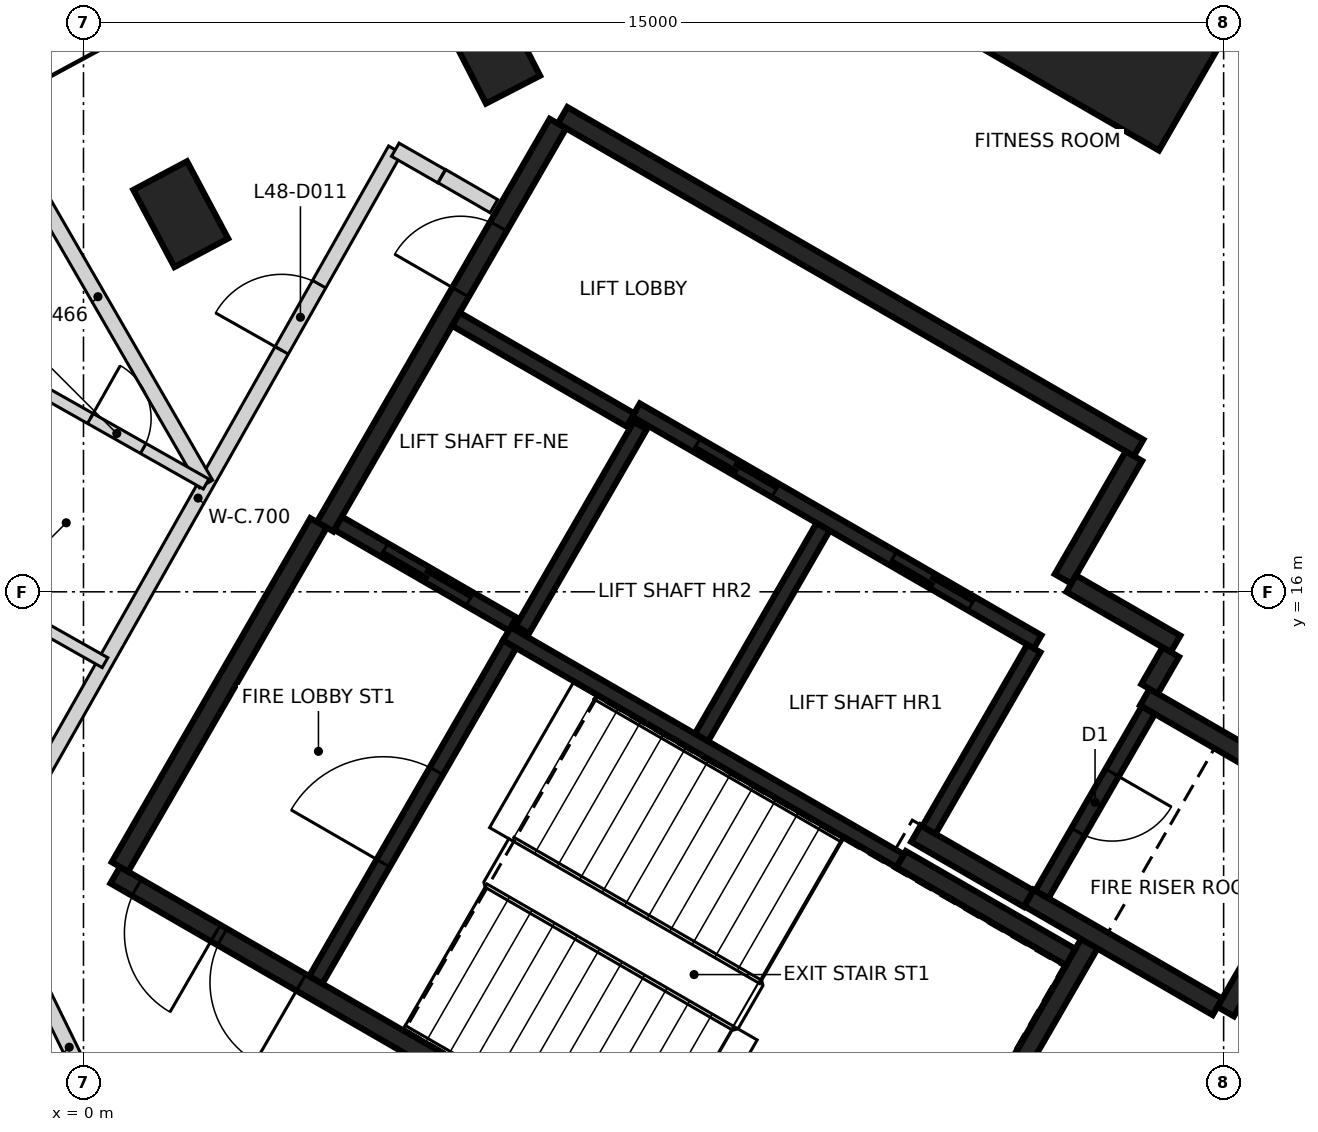
"""IFC4 building model, lengths in metres.
Left out: names, types, materials, properties, quantities, classifications, styles, units other than length and angle.
Written with IfcOpenShell. Run it as: python <this file> out.ifc"""

import sys

from ifc_helpers import new_model, si_unit, direction, frame, frame_2d, origin, origin_2d, place, context, subcontext, project, spatial, rectangle, extrude, element, fill, save


model = new_model("IFC4")
c1 = context("Model", 3, precision=1e-05, world=origin(), true_north=direction((0.0, 1.0)))
c2 = subcontext(c1, "Body", "Model", "MODEL_VIEW")
j1 = project(units=[si_unit("LENGTHUNIT", "METRE"), si_unit("PLANEANGLEUNIT", "RADIAN")], contexts=[c1])
p1 = place(None, origin())
s1 = spatial("IfcSite", under=j1, at=p1, CompositionType="ELEMENT")
p2 = place(p1, origin())
s2 = spatial("IfcBuilding", under=s1, at=p2, CompositionType="ELEMENT")
p3 = place(p2, frame((0.0, 0.0, 193.6)))
s3 = spatial("IfcBuildingStorey", under=s2, at=p3, CompositionType="ELEMENT", Elevation=193.6)
for number, where, z_axis, x_axis in (
    (1, (5.388, 23.118, -0.35), (0.0, 0.0, 1.0), (-0.458, 0.889, 0.0)),
    (2, (1.279, 20.968, -0.35), (0.0, 0.0, 1.0), (-0.47, 0.883, 0.0)),
):
    element("IfcColumn", number, at=place(p3, frame(where, z_axis=z_axis, x_axis=x_axis)), inside=s3, PredefinedType="COLUMN", context=c2, shape_type="SweptSolid", body=[
        extrude(rectangle(XDim=1.15, YDim=0.8, at=origin_2d()), origin(), (0.0, 0.0, 1.0), 3.6),
    ])
p4 = place(p3, frame((13.78, 23.867, -0.35), z_axis=(0.0, 0.0, 1.0), x_axis=(0.5, 0.866025403784, 0.0)))
e3 = element("IfcColumn", 3, at=p4, inside=s3, PredefinedType="COLUMN", context=c2, shape_type="SweptSolid", body=[
    extrude(rectangle(XDim=3.2, YDim=2.7, at=origin_2d()), origin(), (0.0, 0.0, 1.0), 3.6),
])
p5 = place(p3, frame((10.42, 6.498, 0.0), z_axis=(0.0, 0.0, 1.0), x_axis=(-0.866021906294, 0.500006057782, 0.0)))
e4 = element("IfcWall", 4, at=p5, inside=s3, PredefinedType="SHEAR", context=c2, shape_type="SweptSolid", body=[
    extrude(rectangle(XDim=11.55, YDim=0.25, at=frame_2d((5.775, 0.0))), origin(), (0.0, 0.0, 1.0), 3.25),
])
p6 = place(p5, frame((10.025, 0.0, 0.0)))
e5 = element("IfcOpeningElement", 5, at=p6, cuts=e4, PredefinedType="OPENING", context=c2, shape_type="SweptSolid", body=[
    extrude(rectangle(XDim=1.2, YDim=2.1, at=frame_2d((0.6, 1.05))), frame((0.0, 0.135, 0.0), z_axis=(0.0, -1.0, 0.0), x_axis=(1.0, 0.0, 0.0)), (0.0, 0.0, 1.0), 0.27),
])
p7 = place(p5, frame((8.725, 0.0, 0.0)))
e6 = element("IfcOpeningElement", 6, at=p7, cuts=e4, PredefinedType="OPENING", context=c2, shape_type="SweptSolid", body=[
    extrude(rectangle(XDim=1.2, YDim=2.1, at=frame_2d((0.6, 1.05))), frame((0.0, 0.135, 0.0), z_axis=(0.0, -1.0, 0.0), x_axis=(1.0, 0.0, 0.0)), (0.0, 0.0, 1.0), 0.27),
])
p8 = place(p3, frame((6.304, 22.269, 0.0), z_axis=(0.0, 0.0, 1.0), x_axis=(0.866022959057, -0.500004234368, 0.0)))
e7 = element("IfcWall", 7, at=p8, inside=s3, PredefinedType="SHEAR", context=c2, shape_type="SweptSolid", body=[
    extrude(rectangle(XDim=8.75, YDim=0.25, at=frame_2d((4.375, 0.0))), origin(), (0.0, 0.0, 1.0), 3.25),
])
p9 = place(p3, frame((3.179, 16.856, 0.0), z_axis=(0.0, 0.0, 1.0), x_axis=(0.500001955336, 0.866024274868, 0.0)))
e8 = element("IfcWall", 8, at=p9, inside=s3, PredefinedType="SHEAR", context=c2, shape_type="SweptSolid", body=[
    extrude(rectangle(XDim=6.125, YDim=0.25, at=frame_2d((3.062, 0.0))), origin(), (0.0, 0.0, 1.0), 3.25),
])
p10 = place(p9, frame((3.563, 0.0, 0.0)))
e9 = element("IfcOpeningElement", 9, at=p10, cuts=e8, PredefinedType="OPENING", context=c2, shape_type="SweptSolid", body=[
    extrude(rectangle(XDim=1.0, YDim=2.1, at=frame_2d((0.5, 1.05))), frame((0.0, 0.135, 0.0), z_axis=(0.0, -1.0, 0.0), x_axis=(1.0, 0.0, 0.0)), (0.0, 0.0, 1.0), 0.27),
])
p11 = place(p3, frame((0.48, 12.381, 0.0), z_axis=(0.0, 0.0, 1.0), x_axis=(0.49999885962, 0.866026062182, 0.0)))
e10 = element("IfcWall", 10, at=p11, inside=s3, PredefinedType="SHEAR", context=c2, shape_type="SweptSolid", body=[
    extrude(rectangle(XDim=5.225, YDim=0.25, at=frame_2d((2.612, 0.0))), origin(), (0.0, 0.0, 1.0), 3.25),
])
p12 = place(p3, frame((13.238, 11.378, 0.0), z_axis=(0.0, 0.0, 1.0), x_axis=(-0.500008851346, -0.866020293397, 0.0)))
e11 = element("IfcWall", 11, at=p12, inside=s3, PredefinedType="SHEAR", context=c2, shape_type="SweptSolid", body=[
    extrude(rectangle(XDim=5.51, YDim=0.25, at=frame_2d((2.755, 0.0))), origin(), (0.0, 0.0, 1.0), 3.25),
])
p13 = place(p3, frame((16.552, 13.119, 0.0), z_axis=(0.0, 0.0, 1.0), x_axis=(-0.499978833458, -0.866037623948, 0.0)))
e12 = element("IfcWall", 12, at=p13, inside=s3, PredefinedType="SHEAR", context=c2, shape_type="SweptSolid", body=[
    extrude(rectangle(XDim=3.05, YDim=0.25, at=frame_2d((1.525, 0.0))), origin(), (0.0, 0.0, 1.0), 3.25),
])
p14 = place(p3, frame((14.918, 10.54, 0.0), z_axis=(0.0, 0.0, 1.0), x_axis=(-0.866063538972, 0.499933942099, 0.0)))
e13 = element("IfcWall", 13, at=p14, inside=s3, PredefinedType="SHEAR", context=c2, shape_type="SweptSolid", body=[
    extrude(rectangle(XDim=2.865, YDim=0.25, at=frame_2d((1.432, 0.0))), origin(), (0.0, 0.0, 1.0), 3.25),
])
p15 = place(p3, frame((13.963, 14.614, 0.0), z_axis=(0.0, 0.0, 1.0), x_axis=(0.866042235819, -0.499970844928, 0.0)))
e14 = element("IfcWall", 14, at=p15, inside=s3, PredefinedType="SHEAR", context=c2, shape_type="SweptSolid", body=[
    extrude(rectangle(XDim=2.865, YDim=0.25, at=frame_2d((1.432, 0.0))), origin(), (0.0, 0.0, 1.0), 3.25),
])
p16 = place(p3, frame((10.757, 12.481, 0.0), z_axis=(0.0, 0.0, 1.0), x_axis=(0.866022940537, -0.500004266446, 0.0)))
e15 = element("IfcWall", 15, at=p16, inside=s3, PredefinedType="SHEAR", context=c2, shape_type="SweptSolid", body=[
    extrude(rectangle(XDim=2.575, YDim=0.25, at=frame_2d((1.287, 0.0))), origin(), (0.0, 0.0, 1.0), 3.25),
])
p17 = place(p3, frame((13.819, 17.785, 0.0), z_axis=(0.0, 0.0, 1.0), x_axis=(-0.500039802285, -0.866002422705, 0.0)))
e16 = element("IfcWall", 16, at=p17, inside=s3, PredefinedType="SHEAR", context=c2, shape_type="SweptSolid", body=[
    extrude(rectangle(XDim=1.865, YDim=0.25, at=frame_2d((0.932, 0.0))), origin(), (0.0, 0.0, 1.0), 3.25),
])
p18 = place(p3, frame((12.433, 11.964, 0.0), z_axis=(0.0, 0.0, 1.0), x_axis=(-0.866038183914, 0.499977863513, 0.0)))
e17 = element("IfcWall", 17, at=p18, inside=s3, PredefinedType="SHEAR", context=c2, shape_type="SweptSolid", body=[
    extrude(rectangle(XDim=1.71, YDim=0.25, at=frame_2d((0.855, 0.0))), origin(), (0.0, 0.0, 1.0), 3.25),
])
p19 = place(p3, frame((12.995, 16.108, 0.0), z_axis=(0.0, 0.0, 1.0), x_axis=(0.866044474677, -0.49996696679, 0.0)))
e18 = element("IfcWall", 18, at=p19, inside=s3, PredefinedType="SHEAR", context=c2, shape_type="SweptSolid", body=[
    extrude(rectangle(XDim=1.584, YDim=0.25, at=frame_2d((0.792, 0.0))), origin(), (0.0, 0.0, 1.0), 3.25),
])
p20 = place(p3, frame((14.305, 15.207, 0.0), z_axis=(0.0, 0.0, 1.0), x_axis=(-0.499848422343, -0.866112899501, 0.0)))
e19 = element("IfcWall", 19, at=p20, inside=s3, PredefinedType="SHEAR", context=c2, shape_type="SweptSolid", body=[
    extrude(rectangle(XDim=0.559, YDim=0.25, at=frame_2d((0.28, 0.0))), origin(), (0.0, 0.0, 1.0), 3.25),
])
p21 = place(p3, frame((12.552, 15.342, 0.0), z_axis=(0.0, 0.0, 1.0), x_axis=(-0.866030299012, 0.499991521122, 0.0)))
e20 = element("IfcWall", 20, at=p21, inside=s3, PredefinedType="SHEAR", context=c2, shape_type="SweptSolid", body=[
    extrude(rectangle(XDim=6.1, YDim=0.2, at=frame_2d((3.05, 0.0))), origin(), (0.0, 0.0, 1.0), 3.25),
])
p22 = place(p21, frame((1.0, 0.0, 0.0)))
e21 = element("IfcOpeningElement", 21, at=p22, cuts=e20, PredefinedType="OPENING", context=c2, shape_type="SweptSolid", body=[
    extrude(rectangle(XDim=1.2, YDim=2.1, at=frame_2d((0.6, 1.05))), frame((0.0, 0.11, 0.0), z_axis=(0.0, -1.0, 0.0), x_axis=(1.0, 0.0, 0.0)), (0.0, 0.0, 1.0), 0.22),
])
p23 = place(p21, frame((3.982, 0.0, 0.0)))
e22 = element("IfcOpeningElement", 22, at=p23, cuts=e20, PredefinedType="OPENING", context=c2, shape_type="SweptSolid", body=[
    extrude(rectangle(XDim=1.2, YDim=2.1, at=frame_2d((0.6, 1.05))), frame((0.0, 0.11, 0.0), z_axis=(0.0, -1.0, 0.0), x_axis=(1.0, 0.0, 0.0)), (0.0, 0.0, 1.0), 0.22),
])
p24 = place(p3, frame((10.743, 12.46, 0.0), z_axis=(0.0, 0.0, 1.0), x_axis=(-0.866018848283, 0.500011354289, 0.0)))
e23 = element("IfcWall", 23, at=p24, inside=s3, PredefinedType="SHEAR", context=c2, shape_type="SweptSolid", body=[
    extrude(rectangle(XDim=5.974, YDim=0.2, at=frame_2d((2.987, 0.0))), origin(), (0.0, 0.0, 1.0), 3.25),
])
p25 = place(p3, frame((3.057, 10.895, 0.0), z_axis=(0.0, 0.0, 1.0), x_axis=(0.500027839223, 0.866009330205, 0.0)))
e24 = element("IfcWall", 24, at=p25, inside=s3, PredefinedType="SHEAR", context=c2, shape_type="SweptSolid", body=[
    extrude(rectangle(XDim=5.098, YDim=0.2, at=frame_2d((2.549, 0.0))), origin(), (0.0, 0.0, 1.0), 3.25),
])
p26 = place(p25, frame((1.774, 0.0, 0.0)))
e25 = element("IfcOpeningElement", 25, at=p26, cuts=e24, PredefinedType="OPENING", context=c2, shape_type="SweptSolid", body=[
    extrude(rectangle(XDim=1.4, YDim=2.1, at=frame_2d((0.7, 1.05))), frame((0.0, 0.11, 0.0), z_axis=(0.0, -1.0, 0.0), x_axis=(1.0, 0.0, 0.0)), (0.0, 0.0, 1.0), 0.22),
])
p27 = place(p3, frame((8.132, 14.084, 0.0), z_axis=(0.0, 0.0, 1.0), x_axis=(0.500030834389, 0.86600760081, 0.0)))
e26 = element("IfcWall", 26, at=p27, inside=s3, PredefinedType="SHEAR", context=c2, shape_type="SweptSolid", body=[
    extrude(rectangle(XDim=3.198, YDim=0.2, at=frame_2d((1.599, 0.0))), origin(), (0.0, 0.0, 1.0), 3.25),
])
p28 = place(p3, frame((14.008, 14.442, 0.0), z_axis=(0.0, 0.0, 1.0), x_axis=(-0.499986818241, -0.866033014143, 0.0)))
e27 = element("IfcWall", 27, at=p28, inside=s3, PredefinedType="SHEAR", context=c2, shape_type="SweptSolid", body=[
    extrude(rectangle(XDim=2.798, YDim=0.2, at=frame_2d((1.399, 0.0))), origin(), (0.0, 0.0, 1.0), 3.25),
])
p29 = place(p28, frame((0.949, 0.0, 0.0)))
e28 = element("IfcOpeningElement", 28, at=p29, cuts=e27, PredefinedType="OPENING", context=c2, shape_type="SweptSolid", body=[
    extrude(rectangle(XDim=0.9, YDim=2.1, at=frame_2d((0.45, 1.05))), frame((0.0, 0.11, 0.0), z_axis=(0.0, -1.0, 0.0), x_axis=(1.0, 0.0, 0.0)), (0.0, 0.0, 1.0), 0.22),
])
p30 = place(p3, frame((12.502, 15.255, 0.0), z_axis=(0.0, 0.0, 1.0), x_axis=(-0.499965018551, -0.866045599391, 0.0)))
e29 = element("IfcWall", 29, at=p30, inside=s3, PredefinedType="SHEAR", context=c2, shape_type="SweptSolid", body=[
    extrude(rectangle(XDim=2.759, YDim=0.2, at=frame_2d((1.379, 0.0))), origin(), (0.0, 0.0, 1.0), 3.25),
])
p31 = place(p3, frame((7.324, 18.187, 0.0), z_axis=(0.0, 0.0, 1.0), x_axis=(-0.499967891604, -0.866043940782, 0.0)))
e30 = element("IfcWall", 30, at=p31, inside=s3, PredefinedType="SHEAR", context=c2, shape_type="SweptSolid", body=[
    extrude(rectangle(XDim=3.1, YDim=0.2, at=frame_2d((1.55, 0.0))), origin(), (0.0, 0.0, 1.0), 3.25),
])
p32 = place(p3, frame((5.646, 15.576, 0.0), z_axis=(0.0, 0.0, 1.0), x_axis=(-0.866018407898, 0.500012117035, 0.0)))
e31 = element("IfcWall", 31, at=p32, inside=s3, PredefinedType="SHEAR", context=c2, shape_type="SweptSolid", body=[
    extrude(rectangle(XDim=2.651, YDim=0.2, at=frame_2d((1.325, 0.0))), origin(), (0.0, 0.0, 1.0), 3.25),
])
p33 = place(p32, frame((0.652, 0.0, 0.0)))
e32 = element("IfcOpeningElement", 32, at=p33, cuts=e31, PredefinedType="OPENING", context=c2, shape_type="SweptSolid", body=[
    extrude(rectangle(XDim=1.3, YDim=2.1, at=frame_2d((0.65, 1.05))), frame((0.0, 0.11, 0.0), z_axis=(0.0, -1.0, 0.0), x_axis=(1.0, 0.0, 0.0)), (0.0, 0.0, 1.0), 0.22),
])
p34 = place(p3, frame((7.196, 18.26, 0.0), z_axis=(0.0, 0.0, 1.0), x_axis=(-0.866018407898, 0.500012117035, 0.0)))
e33 = element("IfcWall", 33, at=p34, inside=s3, PredefinedType="SHEAR", context=c2, shape_type="SweptSolid", body=[
    extrude(rectangle(XDim=2.651, YDim=0.2, at=frame_2d((1.325, 0.0))), origin(), (0.0, 0.0, 1.0), 3.25),
])
p35 = place(p3, frame((-1.085, 12.65, 0.0), z_axis=(0.0, 0.0, 1.0), x_axis=(0.49243456751, 0.870349468157, 0.0)))
e34 = element("IfcWall", 34, at=p35, inside=s3, PredefinedType="PARTITIONING", context=c2, shape_type="SweptSolid", body=[
    extrude(rectangle(XDim=10.531, YDim=0.2, at=frame_2d((5.266, 0.0))), origin(), (0.0, 0.0, 1.0), 3.25),
])
p36 = place(p35, frame((7.499, 0.0, 0.0)))
e35 = element("IfcOpeningElement", 35, at=p36, cuts=e34, PredefinedType="OPENING", context=c2, shape_type="SweptSolid", body=[
    extrude(rectangle(XDim=1.0, YDim=2.1, at=frame_2d((0.5, 1.05))), frame((0.0, 0.11, 0.0), z_axis=(0.0, -1.0, 0.0), x_axis=(1.0, 0.0, 0.0)), (0.0, 0.0, 1.0), 0.22),
])
p37 = place(p3, frame((-0.964, 11.595, 0.0), z_axis=(0.0, 0.0, 1.0), x_axis=(0.439787800928, -0.898101714816, 0.0)))
e36 = element("IfcWall", 36, at=p37, inside=s3, PredefinedType="PARTITIONING", context=c2, shape_type="SweptSolid", body=[
    extrude(rectangle(XDim=3.532, YDim=0.2, at=frame_2d((1.766, 0.0))), origin(), (0.0, 0.0, 1.0), 3.25),
])
p38 = place(p37, frame((2.382, 0.0, 0.0)))
e37 = element("IfcOpeningElement", 37, at=p38, cuts=e36, PredefinedType="OPENING", context=c2, shape_type="SweptSolid", body=[
    extrude(rectangle(XDim=0.95, YDim=2.1, at=frame_2d((0.475, 1.05))), frame((0.0, 0.11, 0.0), z_axis=(0.0, -1.0, 0.0), x_axis=(1.0, 0.0, 0.0)), (0.0, 0.0, 1.0), 0.22),
])
p39 = place(p3, frame((4.102, 21.816, 0.0), z_axis=(0.0, 0.0, 1.0), x_axis=(0.867664502326, -0.497150189986, 0.0)))
e38 = element("IfcWall", 38, at=p39, inside=s3, PredefinedType="PARTITIONING", context=c2, shape_type="SweptSolid", body=[
    extrude(rectangle(XDim=0.702, YDim=0.2, at=frame_2d((0.351, 0.0))), origin(), (0.0, 0.0, 1.0), 3.25),
])
p40 = place(p3, frame((4.716, 21.468, 0.0), z_axis=(0.0, 0.0, 1.0), x_axis=(0.865912682783, -0.500195187698, 0.0)))
e39 = element("IfcWall", 39, at=p40, inside=s3, PredefinedType="PARTITIONING", context=c2, shape_type="SweptSolid", body=[
    extrude(rectangle(XDim=0.79, YDim=0.2, at=frame_2d((0.395, 0.0))), origin(), (0.0, 0.0, 1.0), 3.25),
])
p41 = place(p3, frame((-1.232, 22.345, 0.0), z_axis=(0.0, 0.0, 1.0), x_axis=(0.499942901263, -0.866058367246, 0.0)))
e40 = element("IfcWall", 40, at=p41, inside=s3, PredefinedType="PARTITIONING", context=c2, shape_type="SweptSolid", body=[
    extrude(rectangle(XDim=5.688, YDim=0.2, at=frame_2d((2.844, 0.0))), origin(), (0.0, 0.0, 1.0), 2.35),
])
p42 = place(p3, frame((-2.067, 16.398, 0.0), z_axis=(0.0, 0.0, 1.0), x_axis=(0.870300002118, -0.492521985614, 0.0)))
e41 = element("IfcWall", 41, at=p42, inside=s3, PredefinedType="PARTITIONING", context=c2, shape_type="SweptSolid", body=[
    extrude(rectangle(XDim=2.7, YDim=0.15, at=frame_2d((1.35, 0.0))), origin(), (0.0, 0.0, 1.0), 3.25),
])
p43 = place(p3, frame((-0.737, 18.748, 0.0), z_axis=(0.0, 0.0, 1.0), x_axis=(0.870283179633, -0.492551710227, 0.0)))
e42 = element("IfcWall", 42, at=p43, inside=s3, PredefinedType="PARTITIONING", context=c2, shape_type="SweptSolid", body=[
    extrude(rectangle(XDim=2.7, YDim=0.15, at=frame_2d((1.35, 0.0))), origin(), (0.0, 0.0, 1.0), 3.25),
])
p44 = place(p43, frame((0.95, 0.0, 0.0)))
e43 = element("IfcOpeningElement", 43, at=p44, cuts=e42, PredefinedType="OPENING", context=c2, shape_type="SweptSolid", body=[
    extrude(rectangle(XDim=0.8, YDim=2.1, at=frame_2d((0.4, 1.05))), frame((0.0, 0.085, 0.0), z_axis=(0.0, -1.0, 0.0), x_axis=(1.0, 0.0, 0.0)), (0.0, 0.0, 1.0), 0.17),
])
p45 = place(p33, origin())
e44 = element("IfcDoor", 44, at=p45, inside=s3, OperationType="SLIDING_TO_LEFT", PredefinedType="DOOR", context=c2, shape_type="SweptSolid", body=[
    extrude(rectangle(XDim=1.3, YDim=2.1, at=frame_2d((0.65, 1.05))), frame((0.0, 0.025, 0.0), z_axis=(0.0, -1.0, 0.0), x_axis=(1.0, 0.0, 0.0)), (0.0, 0.0, 1.0), 0.05),
])
fill(e32, e44)
p46 = place(p22, origin())
e45 = element("IfcDoor", 45, at=p46, inside=s3, OperationType="DOUBLE_DOOR_SLIDING", PredefinedType="DOOR", context=c2, shape_type="SweptSolid", body=[
    extrude(rectangle(XDim=1.2, YDim=2.1, at=frame_2d((0.6, 1.05))), frame((0.0, 0.025, 0.0), z_axis=(0.0, -1.0, 0.0), x_axis=(1.0, 0.0, 0.0)), (0.0, 0.0, 1.0), 0.05),
])
fill(e21, e45)
p47 = place(p23, origin())
e46 = element("IfcDoor", 46, at=p47, inside=s3, OperationType="DOUBLE_DOOR_SLIDING", PredefinedType="DOOR", context=c2, shape_type="SweptSolid", body=[
    extrude(rectangle(XDim=1.2, YDim=2.1, at=frame_2d((0.6, 1.05))), frame((0.0, 0.025, 0.0), z_axis=(0.0, -1.0, 0.0), x_axis=(1.0, 0.0, 0.0)), (0.0, 0.0, 1.0), 0.05),
])
fill(e22, e46)
p48 = place(p10, origin())
e47 = element("IfcDoor", 47, at=p48, inside=s3, OperationType="SINGLE_SWING_LEFT", PredefinedType="DOOR", context=c2, shape_type="SweptSolid", body=[
    extrude(rectangle(XDim=1.0, YDim=2.1, at=frame_2d((0.5, 1.05))), frame((0.0, 0.025, 0.0), z_axis=(0.0, -1.0, 0.0), x_axis=(1.0, 0.0, 0.0)), (0.0, 0.0, 1.0), 0.05),
])
fill(e9, e47)
p49 = place(p6, origin())
e48 = element("IfcDoor", 48, at=p49, inside=s3, OperationType="SINGLE_SWING_LEFT", PredefinedType="DOOR", context=c2, shape_type="SweptSolid", body=[
    extrude(rectangle(XDim=1.2, YDim=2.1, at=frame_2d((0.6, 1.05))), frame((0.0, 0.025, 0.0), z_axis=(0.0, -1.0, 0.0), x_axis=(1.0, 0.0, 0.0)), (0.0, 0.0, 1.0), 0.05),
])
fill(e5, e48)
p50 = place(p7, origin())
e49 = element("IfcDoor", 49, at=p50, inside=s3, OperationType="SINGLE_SWING_RIGHT", PredefinedType="DOOR", context=c2, shape_type="SweptSolid", body=[
    extrude(rectangle(XDim=1.2, YDim=2.1, at=frame_2d((0.6, 1.05))), frame((0.0, 0.025, 0.0), z_axis=(0.0, -1.0, 0.0), x_axis=(1.0, 0.0, 0.0)), (0.0, 0.0, 1.0), 0.05),
])
fill(e6, e49)
p51 = place(p26, origin())
e50 = element("IfcDoor", 50, at=p51, inside=s3, OperationType="SINGLE_SWING_LEFT", PredefinedType="DOOR", context=c2, shape_type="SweptSolid", body=[
    extrude(rectangle(XDim=1.4, YDim=2.1, at=frame_2d((0.7, 1.05))), frame((0.0, 0.025, 0.0), z_axis=(0.0, -1.0, 0.0), x_axis=(1.0, 0.0, 0.0)), (0.0, 0.0, 1.0), 0.05),
])
fill(e25, e50)
p52 = place(p29, origin())
e51 = element("IfcDoor", 51, at=p52, inside=s3, OperationType="SINGLE_SWING_RIGHT", PredefinedType="DOOR", context=c2, shape_type="SweptSolid", body=[
    extrude(rectangle(XDim=0.9, YDim=2.1, at=frame_2d((0.45, 1.05))), frame((0.0, 0.025, 0.0), z_axis=(0.0, -1.0, 0.0), x_axis=(1.0, 0.0, 0.0)), (0.0, 0.0, 1.0), 0.05),
])
fill(e28, e51)
p53 = place(p36, frame((1.0, 0.0, 0.0), z_axis=(0.0, 0.0, 1.0), x_axis=(-1.0, 0.0, 0.0)))
e52 = element("IfcDoor", 52, at=p53, inside=s3, OperationType="SINGLE_SWING_LEFT", PredefinedType="DOOR", context=c2, shape_type="SweptSolid", body=[
    extrude(rectangle(XDim=1.0, YDim=2.1, at=frame_2d((0.5, 1.05))), frame((0.0, 0.025, 0.0), z_axis=(0.0, -1.0, 0.0), x_axis=(1.0, 0.0, 0.0)), (0.0, 0.0, 1.0), 0.05),
])
fill(e35, e52)
p54 = place(p44, frame((0.8, 0.0, 0.0), z_axis=(0.0, 0.0, 1.0), x_axis=(-1.0, 0.0, 0.0)))
e53 = element("IfcDoor", 53, at=p54, inside=s3, OperationType="SINGLE_SWING_LEFT", PredefinedType="DOOR", context=c2, shape_type="SweptSolid", body=[
    extrude(rectangle(XDim=0.8, YDim=2.1, at=frame_2d((0.4, 1.05))), frame((0.0, 0.025, 0.0), z_axis=(0.0, -1.0, 0.0), x_axis=(1.0, 0.0, 0.0)), (0.0, 0.0, 1.0), 0.05),
])
fill(e43, e53)
save(model, sys.argv[1])
